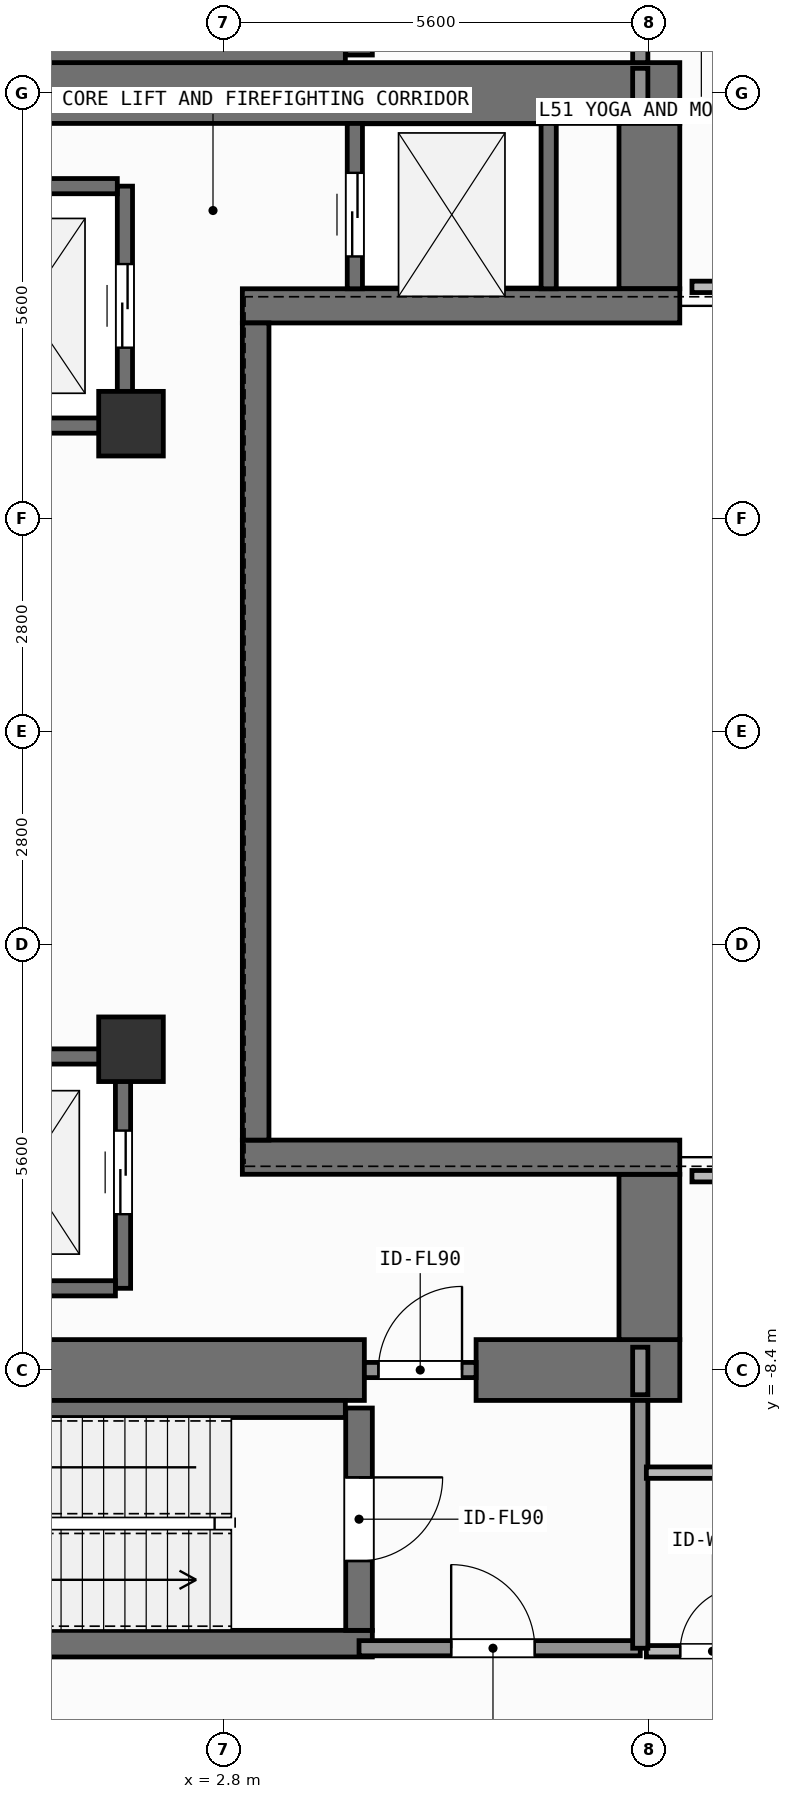
"""IFC4 building model, lengths in metres.
Left out: names, types, materials, properties, quantities, classifications, styles, units other than length and angle.
Written with IfcOpenShell. Run it as: python <this file> out.ifc"""

import sys

from ifc_helpers import new_model, si_unit, direction, frame, frame_2d, origin, origin_2d, place, context, subcontext, project, spatial, rectangle, extrude, element, fill, save


model = new_model("IFC4")
c1 = context("Model", 3, precision=1e-05, world=origin(), true_north=direction((0.0, 1.0)))
c2 = subcontext(c1, "Body", "Model", "MODEL_VIEW")
j1 = project(units=[si_unit("LENGTHUNIT", "METRE"), si_unit("PLANEANGLEUNIT", "RADIAN")], contexts=[c1])
p1 = place(None, origin())
s1 = spatial("IfcSite", under=j1, at=p1, CompositionType="ELEMENT")
p2 = place(p1, origin())
s2 = spatial("IfcBuilding", under=s1, at=p2, CompositionType="ELEMENT")
p3 = place(p2, frame((0.0, 0.0, 207.0)))
s3 = spatial("IfcBuildingStorey", under=s2, at=p3, CompositionType="ELEMENT", Elevation=207.0)
p4 = place(p3, frame((-2.62, -8.4, 0.0), z_axis=(0.0, 0.0, 1.0), x_axis=(1.0, 0.0, 0.0)))
e1 = element("IfcWall", 1, at=p4, inside=s3, PredefinedType="SHEAR", context=c2, shape_type="SweptSolid", body=[
    extrude(rectangle(XDim=7.27, YDim=0.8, at=frame_2d((3.635, 0.0))), origin(), (0.0, 0.0, 1.0), 3.9),
])
p5 = place(p3, frame((6.12, -8.4, 0.0), z_axis=(0.0, 0.0, 1.0), x_axis=(1.0, 0.0, 0.0)))
e2 = element("IfcWall", 2, at=p5, inside=s3, PredefinedType="SHEAR", context=c2, shape_type="SweptSolid", body=[
    extrude(rectangle(XDim=2.68, YDim=0.8, at=frame_2d((1.34, 0.0))), origin(), (0.0, 0.0, 1.0), 3.9),
])
p6 = place(p3, frame((-7.55, 8.4, 0.0), z_axis=(0.0, 0.0, 1.0), x_axis=(1.0, 0.0, 0.0)))
e3 = element("IfcWall", 3, at=p6, inside=s3, PredefinedType="SHEAR", context=c2, shape_type="SweptSolid", body=[
    extrude(rectangle(XDim=16.35, YDim=0.8, at=frame_2d((8.175, 0.0))), origin(), (0.0, 0.0, 1.0), 3.9),
])
for number, where, z_axis, x_axis in (
    (4, (8.4, -8.0, 0.0), (0.0, 0.0, 1.0), (0.0, 1.0, 0.0)),
    (5, (8.4, 5.825, 0.0), (0.0, 0.0, 1.0), (0.0, 1.0, 0.0)),
):
    element("IfcWall", number, at=place(p3, frame(where, z_axis=z_axis, x_axis=x_axis)), inside=s3, PredefinedType="SHEAR", context=c2, shape_type="SweptSolid", body=[
        extrude(rectangle(XDim=2.175, YDim=0.8, at=frame_2d((1.087, 0.0))), origin(), (0.0, 0.0, 1.0), 3.9),
    ])
for number, where, z_axis, x_axis in (
    (6, (3.045, -5.6, 0.0), (0.0, 0.0, 1.0), (1.0, 0.0, 0.0)),
    (7, (3.045, 5.6, 0.0), (0.0, 0.0, 1.0), (1.0, 0.0, 0.0)),
):
    element("IfcWall", number, at=place(p3, frame(where, z_axis=z_axis, x_axis=x_axis)), inside=s3, PredefinedType="SHEAR", context=c2, shape_type="SweptSolid", body=[
        extrude(rectangle(XDim=5.755, YDim=0.45, at=frame_2d((2.877, 0.0))), origin(), (0.0, 0.0, 1.0), 3.9),
    ])
p7 = place(p3, frame((3.22, -5.375, 0.0), z_axis=(0.0, 0.0, 1.0), x_axis=(0.0, 1.0, 0.0)))
e8 = element("IfcWall", 8, at=p7, inside=s3, PredefinedType="SHEAR", context=c2, shape_type="SweptSolid", body=[
    extrude(rectangle(XDim=10.75, YDim=0.35, at=frame_2d((5.375, 0.0))), origin(), (0.0, 0.0, 1.0), 3.9),
])
p8 = place(p3, frame((-2.555, -12.0, 0.0), z_axis=(0.0, 0.0, 1.0), x_axis=(1.0, 0.0, 0.0)))
e9 = element("IfcWall", 9, at=p8, inside=s3, PredefinedType="SHEAR", context=c2, shape_type="SweptSolid", body=[
    extrude(rectangle(XDim=7.31, YDim=0.35, at=frame_2d((3.655, 0.0))), origin(), (0.0, 0.0, 1.0), 3.9),
])
p9 = place(p3, frame((-2.2, -8.913, 0.0), z_axis=(0.0, 0.0, 1.0), x_axis=(1.0, 0.0, 0.0)))
e10 = element("IfcWall", 10, at=p9, inside=s3, PredefinedType="SHEAR", context=c2, shape_type="SweptSolid", body=[
    extrude(rectangle(XDim=6.6, YDim=0.225, at=frame_2d((3.3, 0.0))), origin(), (0.0, 0.0, 1.0), 3.9),
])
p10 = place(p3, frame((4.58, -8.9, 0.0), z_axis=(0.0, 0.0, 1.0), x_axis=(0.0, -1.0, 0.0)))
e11 = element("IfcWall", 11, at=p10, inside=s3, PredefinedType="SHEAR", context=c2, shape_type="SweptSolid", body=[
    extrude(rectangle(XDim=2.925, YDim=0.35, at=frame_2d((1.462, 0.0))), origin(), (0.0, 0.0, 1.0), 3.9),
])
p11 = place(p10, frame((0.913, 0.0, 0.0)))
e12 = element("IfcOpeningElement", 12, at=p11, cuts=e11, PredefinedType="OPENING", context=c2, shape_type="SweptSolid", body=[
    extrude(rectangle(XDim=1.1, YDim=2.15, at=frame_2d((0.55, 1.075))), frame((0.0, 0.185, 0.0), z_axis=(0.0, -1.0, 0.0), x_axis=(1.0, 0.0, 0.0)), (0.0, 0.0, 1.0), 0.37),
])
p12 = place(p3, frame((-2.2, 8.913, 0.0), z_axis=(0.0, 0.0, 1.0), x_axis=(1.0, 0.0, 0.0)))
e13 = element("IfcWall", 13, at=p12, inside=s3, PredefinedType="SHEAR", context=c2, shape_type="SweptSolid", body=[
    extrude(rectangle(XDim=6.6, YDim=0.225, at=frame_2d((3.3, 0.0))), origin(), (0.0, 0.0, 1.0), 3.9),
])
p13 = place(p3, frame((4.58, 11.825, 0.0), z_axis=(0.0, 0.0, 1.0), x_axis=(0.0, -1.0, 0.0)))
e14 = element("IfcWall", 14, at=p13, inside=s3, PredefinedType="SHEAR", context=c2, shape_type="SweptSolid", body=[
    extrude(rectangle(XDim=2.925, YDim=0.35, at=frame_2d((1.462, 0.0))), origin(), (0.0, 0.0, 1.0), 3.9),
])
p14 = place(p13, frame((0.913, 0.0, 0.0)))
e15 = element("IfcOpeningElement", 15, at=p14, cuts=e14, PredefinedType="OPENING", context=c2, shape_type="SweptSolid", body=[
    extrude(rectangle(XDim=1.1, YDim=2.15, at=frame_2d((0.55, 1.075))), frame((0.0, 0.185, 0.0), z_axis=(0.0, -1.0, 0.0), x_axis=(1.0, 0.0, 0.0)), (0.0, 0.0, 1.0), 0.37),
])
for number, where, z_axis, x_axis in (
    (16, (1.58, -4.18, 0.0), (0.0, 0.0, 1.0), (1.0, 0.0, 0.0)),
    (17, (1.58, 4.05, 0.0), (0.0, 0.0, 1.0), (1.0, 0.0, 0.0)),
):
    element("IfcColumn", number, at=place(p3, frame(where, z_axis=z_axis, x_axis=x_axis)), inside=s3, PredefinedType="COLUMN", context=c2, shape_type="SweptSolid", body=[
        extrude(rectangle(XDim=0.85, YDim=0.85, at=origin_2d()), origin(), (0.0, 0.0, 1.0), 3.9),
    ])
p15 = place(p3, frame((1.5, 4.025, 0.0), z_axis=(0.0, 0.0, 1.0), x_axis=(0.0, 1.0, 0.0)))
e18 = element("IfcWall", 18, at=p15, inside=s3, PredefinedType="SHEAR", context=c2, shape_type="SweptSolid", body=[
    extrude(rectangle(XDim=3.15, YDim=0.2, at=frame_2d((1.575, 0.0))), origin(), (0.0, 0.0, 1.0), 3.62),
])
p16 = place(p15, frame((1.025, 0.0, 0.0)))
e19 = element("IfcOpeningElement", 19, at=p16, cuts=e18, PredefinedType="OPENING", context=c2, shape_type="SweptSolid", body=[
    extrude(rectangle(XDim=1.1, YDim=2.2, at=frame_2d((0.55, 1.1))), frame((0.0, 0.11, 0.0), z_axis=(0.0, -1.0, 0.0), x_axis=(1.0, 0.0, 0.0)), (0.0, 0.0, 1.0), 0.22),
])
for number, where, z_axis, x_axis in (
    (20, (-1.0, 4.025, 0.0), (0.0, 0.0, 1.0), (1.0, 0.0, 0.0)),
    (21, (-1.0, 7.175, 0.0), (0.0, 0.0, 1.0), (1.0, 0.0, 0.0)),
):
    element("IfcWall", number, at=place(p3, frame(where, z_axis=z_axis, x_axis=x_axis)), inside=s3, PredefinedType="SHEAR", context=c2, shape_type="SweptSolid", body=[
        extrude(rectangle(XDim=2.4, YDim=0.2, at=frame_2d((1.2, 0.0))), origin(), (0.0, 0.0, 1.0), 3.62),
    ])
p17 = place(p3, frame((1.475, -7.325, 0.0), z_axis=(0.0, 0.0, 1.0), x_axis=(0.0, 1.0, 0.0)))
e22 = element("IfcWall", 22, at=p17, inside=s3, PredefinedType="SHEAR", context=c2, shape_type="SweptSolid", body=[
    extrude(rectangle(XDim=3.05, YDim=0.2, at=frame_2d((1.525, 0.0))), origin(), (0.0, 0.0, 1.0), 3.62),
])
p18 = place(p17, frame((0.975, 0.0, 0.0)))
e23 = element("IfcOpeningElement", 23, at=p18, cuts=e22, PredefinedType="OPENING", context=c2, shape_type="SweptSolid", body=[
    extrude(rectangle(XDim=1.1, YDim=2.2, at=frame_2d((0.55, 1.1))), frame((0.0, 0.11, 0.0), z_axis=(0.0, -1.0, 0.0), x_axis=(1.0, 0.0, 0.0)), (0.0, 0.0, 1.0), 0.22),
])
for number, where, z_axis, x_axis in (
    (24, (-0.975, -7.325, 0.0), (0.0, 0.0, 1.0), (1.0, 0.0, 0.0)),
    (25, (-0.975, -4.275, 0.0), (0.0, 0.0, 1.0), (1.0, 0.0, 0.0)),
):
    element("IfcWall", number, at=place(p3, frame(where, z_axis=z_axis, x_axis=x_axis)), inside=s3, PredefinedType="SHEAR", context=c2, shape_type="SweptSolid", body=[
        extrude(rectangle(XDim=2.35, YDim=0.2, at=frame_2d((1.175, 0.0))), origin(), (0.0, 0.0, 1.0), 3.62),
    ])
p19 = place(p3, frame((4.525, 5.825, 0.0), z_axis=(0.0, 0.0, 1.0), x_axis=(0.0, 1.0, 0.0)))
e26 = element("IfcWall", 26, at=p19, inside=s3, PredefinedType="SHEAR", context=c2, shape_type="SweptSolid", body=[
    extrude(rectangle(XDim=2.175, YDim=0.2, at=frame_2d((1.087, 0.0))), origin(), (0.0, 0.0, 1.0), 3.62),
])
p20 = place(p19, frame((0.425, 0.0, 0.0)))
e27 = element("IfcOpeningElement", 27, at=p20, cuts=e26, PredefinedType="OPENING", context=c2, shape_type="SweptSolid", body=[
    extrude(rectangle(XDim=1.1, YDim=2.2, at=frame_2d((0.55, 1.1))), frame((0.0, 0.11, 0.0), z_axis=(0.0, -1.0, 0.0), x_axis=(1.0, 0.0, 0.0)), (0.0, 0.0, 1.0), 0.22),
])
p21 = place(p3, frame((7.075, 5.825, 0.0), z_axis=(0.0, 0.0, 1.0), x_axis=(0.0, 1.0, 0.0)))
e28 = element("IfcWall", 28, at=p21, inside=s3, PredefinedType="SHEAR", context=c2, shape_type="SweptSolid", body=[
    extrude(rectangle(XDim=2.175, YDim=0.2, at=frame_2d((1.087, 0.0))), origin(), (0.0, 0.0, 1.0), 3.62),
])
p22 = place(p3, frame((4.58, -12.06, 0.0), z_axis=(0.0, 0.0, 1.0), x_axis=(1.0, 0.0, 0.0)))
e29 = element("IfcWall", 29, at=p22, inside=s3, PredefinedType="SOLIDWALL", context=c2, shape_type="SweptSolid", body=[
    extrude(rectangle(XDim=3.7, YDim=0.2, at=frame_2d((1.85, 0.0))), origin(), (0.0, 0.0, 1.0), 3.62),
])
p23 = place(p22, frame((1.212, 0.0, 0.0)))
e30 = element("IfcOpeningElement", 30, at=p23, cuts=e29, PredefinedType="OPENING", context=c2, shape_type="SweptSolid", body=[
    extrude(rectangle(XDim=1.1, YDim=2.15, at=frame_2d((0.55, 1.075))), frame((0.0, 0.11, 0.0), z_axis=(0.0, -1.0, 0.0), x_axis=(1.0, 0.0, 0.0)), (0.0, 0.0, 1.0), 0.22),
])
p24 = place(p3, frame((4.65, -8.4, 0.0), z_axis=(0.0, 0.0, 1.0), x_axis=(1.0, 0.0, 0.0)))
e31 = element("IfcWall", 31, at=p24, inside=s3, PredefinedType="SOLIDWALL", context=c2, shape_type="SweptSolid", body=[
    extrude(rectangle(XDim=1.47, YDim=0.2, at=frame_2d((0.735, 0.0))), origin(), (0.0, 0.0, 1.0), 2.76),
])
p25 = place(p24, frame((0.185, 0.0, 0.0)))
e32 = element("IfcOpeningElement", 32, at=p25, cuts=e31, PredefinedType="OPENING", context=c2, shape_type="SweptSolid", body=[
    extrude(rectangle(XDim=1.1, YDim=2.15, at=frame_2d((0.55, 1.075))), frame((0.0, 0.11, 0.0), z_axis=(0.0, -1.0, 0.0), x_axis=(1.0, 0.0, 0.0)), (0.0, 0.0, 1.0), 0.22),
])
p26 = place(p3, frame((8.36, -12.1, 0.0), z_axis=(0.0, 0.0, 1.0), x_axis=(1.0, 0.0, 0.0)))
e33 = element("IfcWall", 33, at=p26, inside=s3, PredefinedType="PARTITIONING", context=c2, shape_type="SweptSolid", body=[
    extrude(rectangle(XDim=1.74, YDim=0.15, at=frame_2d((0.87, 0.0))), origin(), (0.0, 0.0, 1.0), 3.62),
])
p27 = place(p26, frame((0.445, 0.0, 0.0)))
e34 = element("IfcOpeningElement", 34, at=p27, cuts=e33, PredefinedType="OPENING", context=c2, shape_type="SweptSolid", body=[
    extrude(rectangle(XDim=0.85, YDim=2.1, at=frame_2d((0.425, 1.05))), frame((0.0, 0.085, 0.0), z_axis=(0.0, -1.0, 0.0), x_axis=(1.0, 0.0, 0.0)), (0.0, 0.0, 1.0), 0.17),
])
for number, where, z_axis, x_axis in (
    (35, (8.28, -12.06, 0.0), (0.0, 0.0, 1.0), (0.0, 1.0, 0.0)),
    (36, (8.28, 8.8, 0.0), (0.0, 0.0, 1.0), (0.0, 1.0, 0.0)),
):
    element("IfcWall", number, at=place(p3, frame(where, z_axis=z_axis, x_axis=x_axis)), inside=s3, PredefinedType="SOLIDWALL", context=c2, shape_type="SweptSolid", body=[
        extrude(rectangle(XDim=3.26, YDim=0.2, at=frame_2d((1.63, 0.0))), origin(), (0.0, 0.0, 1.0), 3.62),
    ])
p28 = place(p3, frame((8.28, -8.725, 0.0), z_axis=(0.0, 0.0, 1.0), x_axis=(0.0, 1.0, 0.0)))
e37 = element("IfcWall", 37, at=p28, inside=s3, PredefinedType="SOLIDWALL", context=c2, shape_type="SweptSolid", body=[
    extrude(rectangle(XDim=0.625, YDim=0.2, at=frame_2d((0.312, 0.0))), origin(), (0.0, 0.0, 1.0), 3.62),
])
p29 = place(p3, frame((8.36, -9.75, 0.0), z_axis=(0.0, 0.0, 1.0), x_axis=(1.0, 0.0, 0.0)))
e38 = element("IfcWall", 38, at=p29, inside=s3, PredefinedType="PARTITIONING", context=c2, shape_type="SweptSolid", body=[
    extrude(rectangle(XDim=1.74, YDim=0.15, at=frame_2d((0.87, 0.0))), origin(), (0.0, 0.0, 1.0), 3.62),
])
p30 = place(p3, frame((8.96, -5.85, 0.0), z_axis=(0.0, 0.0, 1.0), x_axis=(1.0, 0.0, 0.0)))
e39 = element("IfcWall", 39, at=p30, inside=s3, PredefinedType="PARTITIONING", context=c2, shape_type="SweptSolid", body=[
    extrude(rectangle(XDim=6.62, YDim=0.15, at=frame_2d((3.31, 0.0))), origin(), (0.0, 0.0, 1.0), 3.62),
])
p31 = place(p3, frame((8.28, 8.1, 0.0), z_axis=(0.0, 0.0, 1.0), x_axis=(0.0, 1.0, 0.0)))
e40 = element("IfcWall", 40, at=p31, inside=s3, PredefinedType="SOLIDWALL", context=c2, shape_type="SweptSolid", body=[
    extrude(rectangle(XDim=0.625, YDim=0.2, at=frame_2d((0.312, 0.0))), origin(), (0.0, 0.0, 1.0), 3.62),
])
p32 = place(p3, frame((8.96, 5.85, 0.0), z_axis=(0.0, 0.0, 1.0), x_axis=(1.0, 0.0, 0.0)))
e41 = element("IfcWall", 41, at=p32, inside=s3, PredefinedType="PARTITIONING", context=c2, shape_type="SweptSolid", body=[
    extrude(rectangle(XDim=6.62, YDim=0.15, at=frame_2d((3.31, 0.0))), origin(), (0.0, 0.0, 1.0), 3.62),
])
p33 = place(p16, origin())
e42 = element("IfcDoor", 42, at=p33, inside=s3, OperationType="SLIDING_TO_LEFT", PredefinedType="DOOR", context=c2, shape_type="SweptSolid", body=[
    extrude(rectangle(XDim=1.1, YDim=2.2, at=frame_2d((0.55, 1.1))), frame((0.0, 0.025, 0.0), z_axis=(0.0, -1.0, 0.0), x_axis=(1.0, 0.0, 0.0)), (0.0, 0.0, 1.0), 0.05),
])
fill(e19, e42)
p34 = place(p18, origin())
e43 = element("IfcDoor", 43, at=p34, inside=s3, OperationType="SLIDING_TO_LEFT", PredefinedType="DOOR", context=c2, shape_type="SweptSolid", body=[
    extrude(rectangle(XDim=1.1, YDim=2.2, at=frame_2d((0.55, 1.1))), frame((0.0, 0.025, 0.0), z_axis=(0.0, -1.0, 0.0), x_axis=(1.0, 0.0, 0.0)), (0.0, 0.0, 1.0), 0.05),
])
fill(e23, e43)
p35 = place(p20, origin())
e44 = element("IfcDoor", 44, at=p35, inside=s3, OperationType="SLIDING_TO_LEFT", PredefinedType="DOOR", context=c2, shape_type="SweptSolid", body=[
    extrude(rectangle(XDim=1.1, YDim=2.2, at=frame_2d((0.55, 1.1))), frame((0.0, 0.025, 0.0), z_axis=(0.0, -1.0, 0.0), x_axis=(1.0, 0.0, 0.0)), (0.0, 0.0, 1.0), 0.05),
])
fill(e27, e44)
p36 = place(p11, origin())
e45 = element("IfcDoor", 45, at=p36, inside=s3, OperationType="SINGLE_SWING_LEFT", PredefinedType="DOOR", context=c2, shape_type="SweptSolid", body=[
    extrude(rectangle(XDim=1.1, YDim=2.15, at=frame_2d((0.55, 1.075))), frame((0.0, 0.025, 0.0), z_axis=(0.0, -1.0, 0.0), x_axis=(1.0, 0.0, 0.0)), (0.0, 0.0, 1.0), 0.05),
])
fill(e12, e45)
p37 = place(p23, origin())
e46 = element("IfcDoor", 46, at=p37, inside=s3, OperationType="SINGLE_SWING_LEFT", PredefinedType="DOOR", context=c2, shape_type="SweptSolid", body=[
    extrude(rectangle(XDim=1.1, YDim=2.15, at=frame_2d((0.55, 1.075))), frame((0.0, 0.025, 0.0), z_axis=(0.0, -1.0, 0.0), x_axis=(1.0, 0.0, 0.0)), (0.0, 0.0, 1.0), 0.05),
])
fill(e30, e46)
p38 = place(p25, origin())
e47 = element("IfcDoor", 47, at=p38, inside=s3, OperationType="SINGLE_SWING_RIGHT", PredefinedType="DOOR", context=c2, shape_type="SweptSolid", body=[
    extrude(rectangle(XDim=1.1, YDim=2.15, at=frame_2d((0.55, 1.075))), frame((0.0, 0.025, 0.0), z_axis=(0.0, -1.0, 0.0), x_axis=(1.0, 0.0, 0.0)), (0.0, 0.0, 1.0), 0.05),
])
fill(e32, e47)
p39 = place(p27, origin())
e48 = element("IfcDoor", 48, at=p39, inside=s3, OperationType="SINGLE_SWING_RIGHT", PredefinedType="DOOR", context=c2, shape_type="SweptSolid", body=[
    extrude(rectangle(XDim=0.85, YDim=2.1, at=frame_2d((0.425, 1.05))), frame((0.0, 0.025, 0.0), z_axis=(0.0, -1.0, 0.0), x_axis=(1.0, 0.0, 0.0)), (0.0, 0.0, 1.0), 0.05),
])
fill(e34, e48)
save(model, sys.argv[1])
